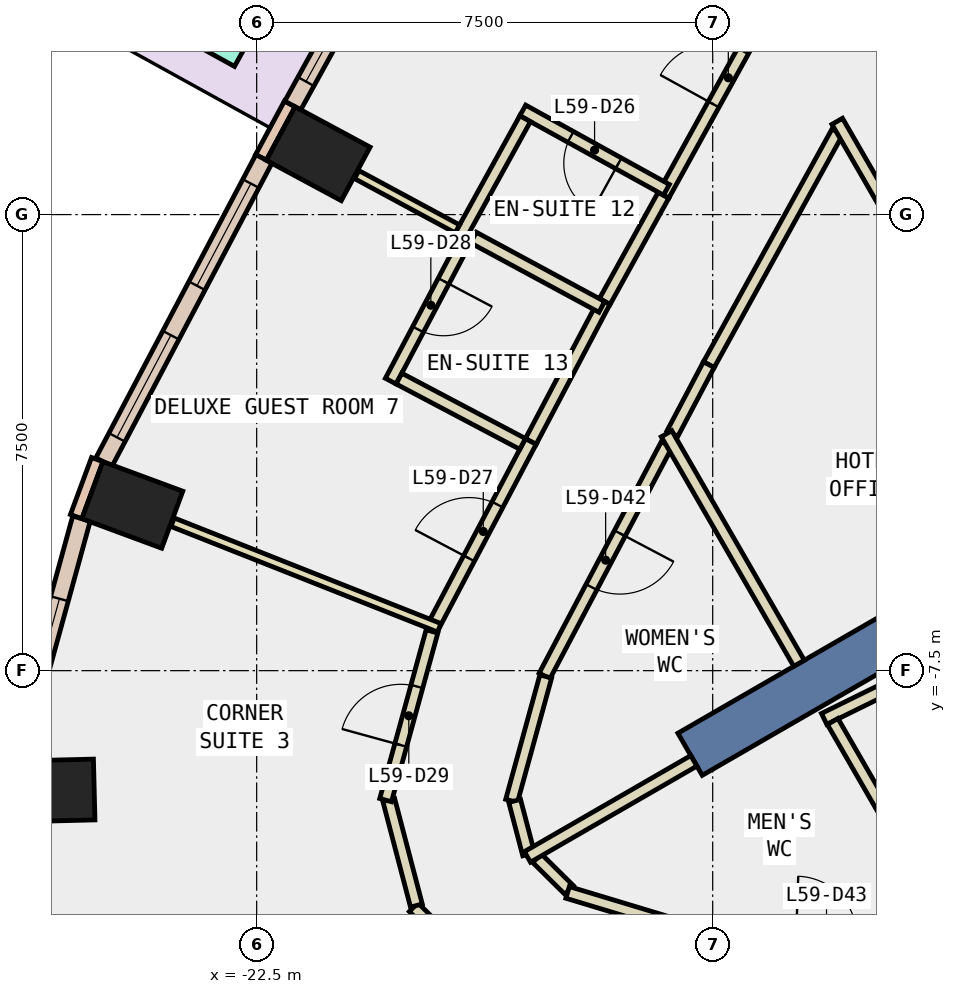
"""IFC4 building model, lengths in metres.
Left out: names, types, materials, properties, quantities, classifications, styles, units other than length and angle.
Written with IfcOpenShell. Run it as: python <this file> out.ifc"""

import sys

from ifc_helpers import new_model, si_unit, direction, frame, frame_2d, origin, origin_2d, place, context, subcontext, project, spatial, rectangle, extrude, element, fill, save


model = new_model("IFC4")
c1 = context("Model", 3, precision=1e-05, world=origin(), true_north=direction((0.0, 1.0)))
c2 = subcontext(c1, "Body", "Model", "MODEL_VIEW")
j1 = project(units=[si_unit("LENGTHUNIT", "METRE"), si_unit("PLANEANGLEUNIT", "RADIAN")], contexts=[c1])
p1 = place(None, origin())
s1 = spatial("IfcSite", under=j1, at=p1, CompositionType="ELEMENT")
p2 = place(p1, origin())
s2 = spatial("IfcBuilding", under=s1, at=p2, CompositionType="ELEMENT")
p3 = place(p2, frame((0.0, 0.0, 259.4)))
s3 = spatial("IfcBuildingStorey", under=s2, at=p3, CompositionType="ELEMENT", Elevation=259.4)
for number, where, z_axis, x_axis in (
    (1, (-21.488, 1.001, -0.34), (0.0, 0.0, 1.0), (0.474, 0.881, 0.0)),
    (2, (-24.545, -4.775, -0.34), (0.0, 0.0, 1.0), (0.347, 0.938, 0.0)),
    (3, (-25.872, -9.472, -0.34), (0.0, 0.0, 1.0), (-0.025, 1.0, 0.0)),
):
    element("IfcColumn", number, at=place(p3, frame(where, z_axis=z_axis, x_axis=x_axis)), inside=s3, PredefinedType="COLUMN", context=c2, shape_type="SweptSolid", body=[
        extrude(rectangle(XDim=1.0, YDim=1.4, at=origin_2d()), origin(), (0.0, 0.0, 1.0), 3.6),
    ])
p4 = place(p3, frame((-7.578, -4.375, -0.34), z_axis=(0.0, 0.0, 1.0), x_axis=(-0.866024315419, -0.5000018851, 0.0)))
e4 = element("IfcWall", 4, at=p4, inside=s3, PredefinedType="SHEAR", context=c2, shape_type="SweptSolid", body=[
    extrude(rectangle(XDim=9.0, YDim=0.8, at=frame_2d((4.5, 0.0))), origin(), (0.0, 0.0, 1.0), 3.6),
])
p5 = place(p3, frame((-21.955, 1.821, 0.0), z_axis=(0.0, 0.0, 1.0), x_axis=(-0.473663196434, -0.88070606694, 0.0)))
e5 = element("IfcWall", 5, at=p5, inside=s3, PredefinedType="STANDARD", context=c2, shape_type="SweptSolid", body=[
    extrude(rectangle(XDim=1.0, YDim=0.2, at=frame_2d((0.5, 0.0))), origin(), (0.0, 0.0, 1.0), 3.26),
])
p6 = place(p3, frame((-25.122, -4.029, 0.0), z_axis=(0.0, 0.0, 1.0), x_axis=(-0.346892928577, -0.937904737222, 0.0)))
e6 = element("IfcWall", 6, at=p6, inside=s3, PredefinedType="STANDARD", context=c2, shape_type="SweptSolid", body=[
    extrude(rectangle(XDim=1.0, YDim=0.2, at=frame_2d((0.5, 0.0))), origin(), (0.0, 0.0, 1.0), 3.26),
])
p7 = place(p3, frame((-19.199, 6.697, 0.0), z_axis=(0.0, 0.0, 1.0), x_axis=(-0.483469062695, -0.875361448441, 0.0)))
e7 = element("IfcWall", 7, at=p7, inside=s3, PredefinedType="STANDARD", context=c2, shape_type="SweptSolid", body=[
    extrude(rectangle(XDim=5.601, YDim=0.3, at=frame_2d((2.801, 0.0))), origin(), (0.0, 0.0, 1.0), 3.26),
])
p8 = place(p7, frame((0.4, 0.0, 0.0)))
e8 = element("IfcOpeningElement", 8, at=p8, cuts=e7, PredefinedType="OPENING", context=c2, shape_type="SweptSolid", body=[
    extrude(rectangle(XDim=2.0, YDim=2.4, at=frame_2d((1.0, 1.2))), frame((0.0, 0.16, 0.0), z_axis=(0.0, -1.0, 0.0), x_axis=(1.0, 0.0, 0.0)), (0.0, 0.0, 1.0), 0.32),
])
p9 = place(p7, frame((3.251, 0.0, 0.9)))
e9 = element("IfcOpeningElement", 9, at=p9, cuts=e7, PredefinedType="OPENING", context=c2, shape_type="SweptSolid", body=[
    extrude(rectangle(XDim=1.9, YDim=2.0, at=frame_2d((0.95, 1.0))), frame((0.0, 0.16, 0.0), z_axis=(0.0, -1.0, 0.0), x_axis=(1.0, 0.0, 0.0)), (0.0, 0.0, 1.0), 0.32),
])
p10 = place(p3, frame((-22.381, 0.916, 0.0), z_axis=(0.0, 0.0, 1.0), x_axis=(-0.466663589714, -0.884434900959, 0.0)))
e10 = element("IfcWall", 10, at=p10, inside=s3, PredefinedType="STANDARD", context=c2, shape_type="SweptSolid", body=[
    extrude(rectangle(XDim=5.638, YDim=0.3, at=frame_2d((2.819, 0.0))), origin(), (0.0, 0.0, 1.0), 3.26),
])
p11 = place(p10, frame((0.459, 0.0, 0.9)))
e11 = element("IfcOpeningElement", 11, at=p11, cuts=e10, PredefinedType="OPENING", context=c2, shape_type="SweptSolid", body=[
    extrude(rectangle(XDim=1.9, YDim=2.0, at=frame_2d((0.95, 1.0))), frame((0.0, 0.16, 0.0), z_axis=(0.0, -1.0, 0.0), x_axis=(1.0, 0.0, 0.0)), (0.0, 0.0, 1.0), 0.32),
])
p12 = place(p10, frame((3.278, 0.0, 0.9)))
e12 = element("IfcOpeningElement", 12, at=p12, cuts=e10, PredefinedType="OPENING", context=c2, shape_type="SweptSolid", body=[
    extrude(rectangle(XDim=1.9, YDim=2.0, at=frame_2d((0.95, 1.0))), frame((0.0, 0.16, 0.0), z_axis=(0.0, -1.0, 0.0), x_axis=(1.0, 0.0, 0.0)), (0.0, 0.0, 1.0), 0.32),
])
p13 = place(p3, frame((-25.381, -4.998, 0.0), z_axis=(0.0, 0.0, 1.0), x_axis=(-0.264924661919, -0.964269113633, 0.0)))
e13 = element("IfcWall", 13, at=p13, inside=s3, PredefinedType="STANDARD", context=c2, shape_type="SweptSolid", body=[
    extrude(rectangle(XDim=4.137, YDim=0.3, at=frame_2d((2.068, 0.0))), origin(), (0.0, 0.0, 1.0), 3.26),
])
p14 = place(p13, frame((1.368, 0.0, 0.9)))
e14 = element("IfcOpeningElement", 14, at=p14, cuts=e13, PredefinedType="OPENING", context=c2, shape_type="SweptSolid", body=[
    extrude(rectangle(XDim=1.4, YDim=2.0, at=frame_2d((0.7, 1.0))), frame((0.0, 0.16, 0.0), z_axis=(0.0, -1.0, 0.0), x_axis=(1.0, 0.0, 0.0)), (0.0, 0.0, 1.0), 0.32),
])
p15 = place(p3, frame((-26.488, -9.986, 0.0), z_axis=(0.0, 0.0, 1.0), x_axis=(0.253248721632, -0.967401201669, 0.0)))
e15 = element("IfcWall", 15, at=p15, inside=s3, PredefinedType="STANDARD", context=c2, shape_type="SweptSolid", body=[
    extrude(rectangle(XDim=3.834, YDim=0.3, at=frame_2d((1.917, 0.0))), origin(), (0.0, 0.0, 1.0), 3.26),
])
p16 = place(p15, frame((1.217, 0.0, 0.9)))
e16 = element("IfcOpeningElement", 16, at=p16, cuts=e15, PredefinedType="OPENING", context=c2, shape_type="SweptSolid", body=[
    extrude(rectangle(XDim=1.4, YDim=2.0, at=frame_2d((0.7, 1.0))), frame((0.0, 0.16, 0.0), z_axis=(0.0, -1.0, 0.0), x_axis=(1.0, 0.0, 0.0)), (0.0, 0.0, 1.0), 0.32),
])
p17 = place(p3, frame((-20.604, 7.36, 0.0), z_axis=(0.0, 0.0, 1.0), x_axis=(-0.483262482812, -0.87547551234, 0.0)))
e17 = element("IfcWall", 17, at=p17, inside=s3, PredefinedType="STANDARD", context=c2, shape_type="SweptSolid", body=[
    extrude(rectangle(XDim=5.403, YDim=0.8, at=frame_2d((2.702, 0.0))), origin(), (0.0, 0.0, 1.0), 0.8),
])
p18 = place(p3, frame((-12.95, 1.36, 0.0), z_axis=(0.0, 0.0, 1.0), x_axis=(-0.483418231124, -0.875389521194, 0.0)))
e18 = element("IfcWall", 18, at=p18, inside=s3, PredefinedType="PARTITIONING", context=c2, shape_type="SweptSolid", body=[
    extrude(rectangle(XDim=4.373, YDim=0.2, at=frame_2d((2.187, 0.0))), origin(), (0.0, 0.0, 1.0), 3.26),
])
p19 = place(p3, frame((-15.064, -2.468, 0.0), z_axis=(0.0, 0.0, 1.0), x_axis=(-0.467126648849, -0.884190417238, 0.0)))
e19 = element("IfcWall", 19, at=p19, inside=s3, PredefinedType="PARTITIONING", context=c2, shape_type="SweptSolid", body=[
    extrude(rectangle(XDim=1.282, YDim=0.2, at=frame_2d((0.641, 0.0))), origin(), (0.0, 0.0, 1.0), 3.26),
])
p20 = place(p3, frame((-15.756, -3.779, 0.0), z_axis=(0.0, 0.0, 1.0), x_axis=(-0.46672043873, -0.884404902786, 0.0)))
e20 = element("IfcWall", 20, at=p20, inside=s3, PredefinedType="PARTITIONING", context=c2, shape_type="SweptSolid", body=[
    extrude(rectangle(XDim=4.307, YDim=0.2, at=frame_2d((2.153, 0.0))), origin(), (0.0, 0.0, 1.0), 3.26),
])
p21 = place(p20, frame((1.653, 0.0, 0.0)))
e21 = element("IfcOpeningElement", 21, at=p21, cuts=e20, PredefinedType="OPENING", context=c2, shape_type="SweptSolid", body=[
    extrude(rectangle(XDim=1.0, YDim=2.1, at=frame_2d((0.5, 1.05))), frame((0.0, 0.11, 0.0), z_axis=(0.0, -1.0, 0.0), x_axis=(1.0, 0.0, 0.0)), (0.0, 0.0, 1.0), 0.22),
])
p22 = place(p3, frame((-17.746, -7.596, 0.0), z_axis=(0.0, 0.0, 1.0), x_axis=(-0.264859637197, -0.96428697626, 0.0)))
e22 = element("IfcWall", 22, at=p22, inside=s3, PredefinedType="PARTITIONING", context=c2, shape_type="SweptSolid", body=[
    extrude(rectangle(XDim=2.122, YDim=0.2, at=frame_2d((1.061, 0.0))), origin(), (0.0, 0.0, 1.0), 3.26),
])
p23 = place(p3, frame((-18.257, -9.642, 0.0), z_axis=(0.0, 0.0, 1.0), x_axis=(0.253407342366, -0.967359663639, 0.0)))
e23 = element("IfcWall", 23, at=p23, inside=s3, PredefinedType="PARTITIONING", context=c2, shape_type="SweptSolid", body=[
    extrude(rectangle(XDim=0.907, YDim=0.2, at=frame_2d((0.454, 0.0))), origin(), (0.0, 0.0, 1.0), 3.26),
])
p24 = place(p3, frame((-17.89, -10.584, 0.0), z_axis=(0.0, 0.0, 1.0), x_axis=(0.711042348586, -0.70314918653, 0.0)))
e24 = element("IfcWall", 24, at=p24, inside=s3, PredefinedType="PARTITIONING", context=c2, shape_type="SweptSolid", body=[
    extrude(rectangle(XDim=0.742, YDim=0.2, at=frame_2d((0.371, 0.0))), origin(), (0.0, 0.0, 1.0), 3.26),
])
p25 = place(p3, frame((-17.386, -11.147, 0.0), z_axis=(0.0, 0.0, 1.0), x_axis=(0.957321496956, -0.289025174451, 0.0)))
e25 = element("IfcWall", 25, at=p25, inside=s3, PredefinedType="PARTITIONING", context=c2, shape_type="SweptSolid", body=[
    extrude(rectangle(XDim=2.256, YDim=0.2, at=frame_2d((1.128, 0.0))), origin(), (0.0, 0.0, 1.0), 3.26),
])
p26 = place(p3, frame((-15.809, 0.32, 0.0), z_axis=(0.0, 0.0, 1.0), x_axis=(0.483322920175, 0.875442148193, 0.0)))
e26 = element("IfcWall", 26, at=p26, inside=s3, PredefinedType="PARTITIONING", context=c2, shape_type="SweptSolid", body=[
    extrude(rectangle(XDim=4.31, YDim=0.2, at=frame_2d((2.155, 0.0))), origin(), (0.0, 0.0, 1.0), 3.26),
])
p27 = place(p26, frame((1.705, 0.0, 0.0)))
e27 = element("IfcOpeningElement", 27, at=p27, cuts=e26, PredefinedType="OPENING", context=c2, shape_type="SweptSolid", body=[
    extrude(rectangle(XDim=1.0, YDim=2.1, at=frame_2d((0.5, 1.05))), frame((0.0, 0.11, 0.0), z_axis=(0.0, -1.0, 0.0), x_axis=(1.0, 0.0, 0.0)), (0.0, 0.0, 1.0), 0.22),
])
p28 = place(p3, frame((-16.776, -1.43, 0.0), z_axis=(0.0, 0.0, 1.0), x_axis=(0.48360724937, 0.87528511261, 0.0)))
e28 = element("IfcWall", 28, at=p28, inside=s3, PredefinedType="PARTITIONING", context=c2, shape_type="SweptSolid", body=[
    extrude(rectangle(XDim=1.997, YDim=0.2, at=frame_2d((0.999, 0.0))), origin(), (0.0, 0.0, 1.0), 3.26),
])
p29 = place(p3, frame((-19.602, -6.781, 0.0), z_axis=(0.0, 0.0, 1.0), x_axis=(0.466827780692, 0.884348247679, 0.0)))
e29 = element("IfcWall", 29, at=p29, inside=s3, PredefinedType="PARTITIONING", context=c2, shape_type="SweptSolid", body=[
    extrude(rectangle(XDim=3.451, YDim=0.2, at=frame_2d((1.726, 0.0))), origin(), (0.0, 0.0, 1.0), 3.26),
])
p30 = place(p29, frame((1.275, 0.0, 0.0)))
e30 = element("IfcOpeningElement", 30, at=p30, cuts=e29, PredefinedType="OPENING", context=c2, shape_type="SweptSolid", body=[
    extrude(rectangle(XDim=1.0, YDim=2.1, at=frame_2d((0.5, 1.05))), frame((0.0, 0.11, 0.0), z_axis=(0.0, -1.0, 0.0), x_axis=(1.0, 0.0, 0.0)), (0.0, 0.0, 1.0), 0.22),
])
p31 = place(p3, frame((-17.991, -3.729, 0.0), z_axis=(0.0, 0.0, 1.0), x_axis=(0.466450569784, 0.88454726609, 0.0)))
e31 = element("IfcWall", 31, at=p31, inside=s3, PredefinedType="PARTITIONING", context=c2, shape_type="SweptSolid", body=[
    extrude(rectangle(XDim=2.6, YDim=0.2, at=frame_2d((1.3, 0.0))), origin(), (0.0, 0.0, 1.0), 3.26),
])
p32 = place(p3, frame((-18.415, -12.877, 0.0), z_axis=(0.0, 0.0, 1.0), x_axis=(-0.711078065077, 0.70311306727, 0.0)))
e32 = element("IfcWall", 32, at=p32, inside=s3, PredefinedType="PARTITIONING", context=c2, shape_type="SweptSolid", body=[
    extrude(rectangle(XDim=2.115, YDim=0.2, at=frame_2d((1.058, 0.0))), origin(), (0.0, 0.0, 1.0), 3.26),
])
p33 = place(p3, frame((-19.873, -11.363, 0.0), z_axis=(0.0, 0.0, 1.0), x_axis=(-0.253192482031, 0.967415922467, 0.0)))
e33 = element("IfcWall", 33, at=p33, inside=s3, PredefinedType="PARTITIONING", context=c2, shape_type="SweptSolid", body=[
    extrude(rectangle(XDim=1.792, YDim=0.2, at=frame_2d((0.896, 0.0))), origin(), (0.0, 0.0, 1.0), 3.26),
])
p34 = place(p3, frame((-20.379, -9.629, 0.0), z_axis=(0.0, 0.0, 1.0), x_axis=(0.26487636938, 0.964282380293, 0.0)))
e34 = element("IfcWall", 34, at=p34, inside=s3, PredefinedType="PARTITIONING", context=c2, shape_type="SweptSolid", body=[
    extrude(rectangle(XDim=2.877, YDim=0.2, at=frame_2d((1.438, 0.0))), origin(), (0.0, 0.0, 1.0), 3.26),
])
p35 = place(p34, frame((0.938, 0.0, 0.0)))
e35 = element("IfcOpeningElement", 35, at=p35, cuts=e34, PredefinedType="OPENING", context=c2, shape_type="SweptSolid", body=[
    extrude(rectangle(XDim=1.0, YDim=2.1, at=frame_2d((0.5, 1.05))), frame((0.0, 0.11, 0.0), z_axis=(0.0, -1.0, 0.0), x_axis=(1.0, 0.0, 0.0)), (0.0, 0.0, 1.0), 0.22),
])
p36 = place(p3, frame((-8.582, -6.036, 0.0), z_axis=(0.0, 0.0, 1.0), x_axis=(-0.897105141673, -0.441817116897, 0.0)))
e36 = element("IfcWall", 36, at=p36, inside=s3, PredefinedType="PARTITIONING", context=c2, shape_type="SweptSolid", body=[
    extrude(rectangle(XDim=5.111, YDim=0.2, at=frame_2d((2.555, 0.0))), origin(), (0.0, 0.0, 1.0), 3.26),
])
p37 = place(p3, frame((-13.58, -7.379, 0.0), z_axis=(0.0, 0.0, 1.0), x_axis=(-0.499916403993, 0.866073662582, 0.0)))
e37 = element("IfcWall", 37, at=p37, inside=s3, PredefinedType="PARTITIONING", context=c2, shape_type="SweptSolid", body=[
    extrude(rectangle(XDim=4.359, YDim=0.2, at=frame_2d((2.179, 0.0))), origin(), (0.0, 0.0, 1.0), 3.26),
])
p38 = place(p3, frame((-10.876, -12.062, 0.0), z_axis=(0.0, 0.0, 1.0), x_axis=(-0.499977877545, 0.866038175813, 0.0)))
e38 = element("IfcWall", 38, at=p38, inside=s3, PredefinedType="PARTITIONING", context=c2, shape_type="SweptSolid", body=[
    extrude(rectangle(XDim=4.302, YDim=0.2, at=frame_2d((2.151, 0.0))), origin(), (0.0, 0.0, 1.0), 3.26),
])
p39 = place(p3, frame((-15.31, -8.983, 0.0), z_axis=(0.0, 0.0, 1.0), x_axis=(-0.866047943894, -0.499960957353, 0.0)))
e39 = element("IfcWall", 39, at=p39, inside=s3, PredefinedType="PARTITIONING", context=c2, shape_type="SweptSolid", body=[
    extrude(rectangle(XDim=3.16, YDim=0.2, at=frame_2d((1.58, 0.0))), origin(), (0.0, 0.0, 1.0), 3.26),
])
p40 = place(p3, frame((-15.761, 0.408, 0.0), z_axis=(0.0, 0.0, 1.0), x_axis=(-0.875391622802, 0.483414425445, 0.0)))
e40 = element("IfcWall", 40, at=p40, inside=s3, PredefinedType="PARTITIONING", context=c2, shape_type="SweptSolid", body=[
    extrude(rectangle(XDim=2.699, YDim=0.2, at=frame_2d((1.35, 0.0))), origin(), (0.0, 0.0, 1.0), 3.26),
])
p41 = place(p40, frame((0.9, 0.0, 0.0)))
e41 = element("IfcOpeningElement", 41, at=p41, cuts=e40, PredefinedType="OPENING", context=c2, shape_type="SweptSolid", body=[
    extrude(rectangle(XDim=0.9, YDim=2.1, at=frame_2d((0.45, 1.05))), frame((0.0, 0.11, 0.0), z_axis=(0.0, -1.0, 0.0), x_axis=(1.0, 0.0, 0.0)), (0.0, 0.0, 1.0), 0.22),
])
p42 = place(p3, frame((-18.085, 1.577, 0.0), z_axis=(0.0, 0.0, 1.0), x_axis=(-0.483329790342, -0.875438355207, 0.0)))
e42 = element("IfcWall", 42, at=p42, inside=s3, PredefinedType="PARTITIONING", context=c2, shape_type="SweptSolid", body=[
    extrude(rectangle(XDim=2.224, YDim=0.2, at=frame_2d((1.112, 0.0))), origin(), (0.0, 0.0, 1.0), 3.26),
])
p43 = place(p3, frame((-19.199, -0.235, 0.0), z_axis=(0.0, 0.0, 1.0), x_axis=(-0.880166754904, 0.474664601126, 0.0)))
e43 = element("IfcWall", 43, at=p43, inside=s3, PredefinedType="PARTITIONING", context=c2, shape_type="SweptSolid", body=[
    extrude(rectangle(XDim=1.881, YDim=0.15, at=frame_2d((0.941, 0.0))), origin(), (0.0, 0.0, 1.0), 3.26),
])
p44 = place(p3, frame((-16.824, -1.518, 0.0), z_axis=(0.0, 0.0, 1.0), x_axis=(-0.879879019938, 0.47519775912, 0.0)))
e44 = element("IfcWall", 44, at=p44, inside=s3, PredefinedType="PARTITIONING", context=c2, shape_type="SweptSolid", body=[
    extrude(rectangle(XDim=2.399, YDim=0.2, at=frame_2d((1.2, 0.0))), origin(), (0.0, 0.0, 1.0), 3.26),
])
p45 = place(p3, frame((-19.069, -0.418, 0.0), z_axis=(0.0, 0.0, 1.0), x_axis=(-0.467007153784, -0.884253537349, 0.0)))
e45 = element("IfcWall", 45, at=p45, inside=s3, PredefinedType="PARTITIONING", context=c2, shape_type="SweptSolid", body=[
    extrude(rectangle(XDim=2.625, YDim=0.2, at=frame_2d((1.312, 0.0))), origin(), (0.0, 0.0, 1.0), 3.26),
])
p46 = place(p45, frame((0.763, 0.0, 0.0)))
e46 = element("IfcOpeningElement", 46, at=p46, cuts=e45, PredefinedType="OPENING", context=c2, shape_type="SweptSolid", body=[
    extrude(rectangle(XDim=0.9, YDim=2.1, at=frame_2d((0.45, 1.05))), frame((0.0, 0.11, 0.0), z_axis=(0.0, -1.0, 0.0), x_axis=(1.0, 0.0, 0.0)), (0.0, 0.0, 1.0), 0.22),
])
p47 = place(p3, frame((-20.16, -2.697, 0.0), z_axis=(0.0, 0.0, 1.0), x_axis=(0.884293452572, -0.466931568583, 0.0)))
e47 = element("IfcWall", 47, at=p47, inside=s3, PredefinedType="PARTITIONING", context=c2, shape_type="SweptSolid", body=[
    extrude(rectangle(XDim=2.3, YDim=0.2, at=frame_2d((1.15, 0.0))), origin(), (0.0, 0.0, 1.0), 3.26),
])
p48 = place(p3, frame((-19.497, -6.795, 0.0), z_axis=(0.0, 0.0, 1.0), x_axis=(-0.929826906887, 0.367997178289, 0.0)))
e48 = element("IfcWall", 48, at=p48, inside=s3, PredefinedType="PARTITIONING", context=c2, shape_type="SweptSolid", body=[
    extrude(rectangle(XDim=4.717, YDim=0.15, at=frame_2d((2.358, 0.0))), origin(), (0.0, 0.0, 1.0), 3.26),
])
p49 = place(p3, frame((-9.25, -4.879, 0.0), z_axis=(0.0, 0.0, 1.0), x_axis=(-0.499944124422, 0.866057661161, 0.0)))
e49 = element("IfcWall", 49, at=p49, inside=s3, PredefinedType="PARTITIONING", context=c2, shape_type="SweptSolid", body=[
    extrude(rectangle(XDim=7.405, YDim=0.2, at=frame_2d((3.702, 0.0))), origin(), (0.0, 0.0, 1.0), 3.26),
])
p50 = place(p49, frame((2.533, 0.0, 0.0)))
e50 = element("IfcOpeningElement", 50, at=p50, cuts=e49, PredefinedType="OPENING", context=c2, shape_type="SweptSolid", body=[
    extrude(rectangle(XDim=0.9, YDim=2.1, at=frame_2d((0.45, 1.05))), frame((0.0, 0.11, 0.0), z_axis=(0.0, -1.0, 0.0), x_axis=(1.0, 0.0, 0.0)), (0.0, 0.0, 1.0), 0.22),
])
p51 = place(p9, origin())
e51 = element("IfcWindow", 51, at=p51, inside=s3, PartitioningType="SINGLE_PANEL", PredefinedType="WINDOW", context=c2, shape_type="SweptSolid", body=[
    extrude(rectangle(XDim=1.9, YDim=2.0, at=frame_2d((0.95, 1.0))), frame((0.0, 0.03, 0.0), z_axis=(0.0, -1.0, 0.0), x_axis=(1.0, 0.0, 0.0)), (0.0, 0.0, 1.0), 0.06),
])
fill(e9, e51)
p52 = place(p11, origin())
e52 = element("IfcWindow", 52, at=p52, inside=s3, PartitioningType="SINGLE_PANEL", PredefinedType="WINDOW", context=c2, shape_type="SweptSolid", body=[
    extrude(rectangle(XDim=1.9, YDim=2.0, at=frame_2d((0.95, 1.0))), frame((0.0, 0.03, 0.0), z_axis=(0.0, -1.0, 0.0), x_axis=(1.0, 0.0, 0.0)), (0.0, 0.0, 1.0), 0.06),
])
fill(e11, e52)
p53 = place(p12, origin())
e53 = element("IfcWindow", 53, at=p53, inside=s3, PartitioningType="SINGLE_PANEL", PredefinedType="WINDOW", context=c2, shape_type="SweptSolid", body=[
    extrude(rectangle(XDim=1.9, YDim=2.0, at=frame_2d((0.95, 1.0))), frame((0.0, 0.03, 0.0), z_axis=(0.0, -1.0, 0.0), x_axis=(1.0, 0.0, 0.0)), (0.0, 0.0, 1.0), 0.06),
])
fill(e12, e53)
p54 = place(p14, origin())
e54 = element("IfcWindow", 54, at=p54, inside=s3, PartitioningType="SINGLE_PANEL", PredefinedType="WINDOW", context=c2, shape_type="SweptSolid", body=[
    extrude(rectangle(XDim=1.4, YDim=2.0, at=frame_2d((0.7, 1.0))), frame((0.0, 0.03, 0.0), z_axis=(0.0, -1.0, 0.0), x_axis=(1.0, 0.0, 0.0)), (0.0, 0.0, 1.0), 0.06),
])
fill(e14, e54)
p55 = place(p16, origin())
e55 = element("IfcWindow", 55, at=p55, inside=s3, PartitioningType="SINGLE_PANEL", PredefinedType="WINDOW", context=c2, shape_type="SweptSolid", body=[
    extrude(rectangle(XDim=1.4, YDim=2.0, at=frame_2d((0.7, 1.0))), frame((0.0, 0.03, 0.0), z_axis=(0.0, -1.0, 0.0), x_axis=(1.0, 0.0, 0.0)), (0.0, 0.0, 1.0), 0.06),
])
fill(e16, e55)
p56 = place(p27, origin())
e56 = element("IfcDoor", 56, at=p56, inside=s3, OperationType="SINGLE_SWING_RIGHT", PredefinedType="DOOR", context=c2, shape_type="SweptSolid", body=[
    extrude(rectangle(XDim=1.0, YDim=2.1, at=frame_2d((0.5, 1.05))), frame((0.0, 0.025, 0.0), z_axis=(0.0, -1.0, 0.0), x_axis=(1.0, 0.0, 0.0)), (0.0, 0.0, 1.0), 0.05),
])
fill(e27, e56)
p57 = place(p41, origin())
e57 = element("IfcDoor", 57, at=p57, inside=s3, OperationType="SINGLE_SWING_LEFT", PredefinedType="DOOR", context=c2, shape_type="SweptSolid", body=[
    extrude(rectangle(XDim=0.9, YDim=2.1, at=frame_2d((0.45, 1.05))), frame((0.0, 0.025, 0.0), z_axis=(0.0, -1.0, 0.0), x_axis=(1.0, 0.0, 0.0)), (0.0, 0.0, 1.0), 0.05),
])
fill(e41, e57)
p58 = place(p30, origin())
e58 = element("IfcDoor", 58, at=p58, inside=s3, OperationType="SINGLE_SWING_LEFT", PredefinedType="DOOR", context=c2, shape_type="SweptSolid", body=[
    extrude(rectangle(XDim=1.0, YDim=2.1, at=frame_2d((0.5, 1.05))), frame((0.0, 0.025, 0.0), z_axis=(0.0, -1.0, 0.0), x_axis=(1.0, 0.0, 0.0)), (0.0, 0.0, 1.0), 0.05),
])
fill(e30, e58)
p59 = place(p46, origin())
e59 = element("IfcDoor", 59, at=p59, inside=s3, OperationType="SINGLE_SWING_LEFT", PredefinedType="DOOR", context=c2, shape_type="SweptSolid", body=[
    extrude(rectangle(XDim=0.9, YDim=2.1, at=frame_2d((0.45, 1.05))), frame((0.0, 0.025, 0.0), z_axis=(0.0, -1.0, 0.0), x_axis=(1.0, 0.0, 0.0)), (0.0, 0.0, 1.0), 0.05),
])
fill(e46, e59)
p60 = place(p35, origin())
e60 = element("IfcDoor", 60, at=p60, inside=s3, OperationType="SINGLE_SWING_LEFT", PredefinedType="DOOR", context=c2, shape_type="SweptSolid", body=[
    extrude(rectangle(XDim=1.0, YDim=2.1, at=frame_2d((0.5, 1.05))), frame((0.0, 0.025, 0.0), z_axis=(0.0, -1.0, 0.0), x_axis=(1.0, 0.0, 0.0)), (0.0, 0.0, 1.0), 0.05),
])
fill(e35, e60)
p61 = place(p21, origin())
e61 = element("IfcDoor", 61, at=p61, inside=s3, OperationType="SINGLE_SWING_LEFT", PredefinedType="DOOR", context=c2, shape_type="SweptSolid", body=[
    extrude(rectangle(XDim=1.0, YDim=2.1, at=frame_2d((0.5, 1.05))), frame((0.0, 0.025, 0.0), z_axis=(0.0, -1.0, 0.0), x_axis=(1.0, 0.0, 0.0)), (0.0, 0.0, 1.0), 0.05),
])
fill(e21, e61)
save(model, sys.argv[1])
